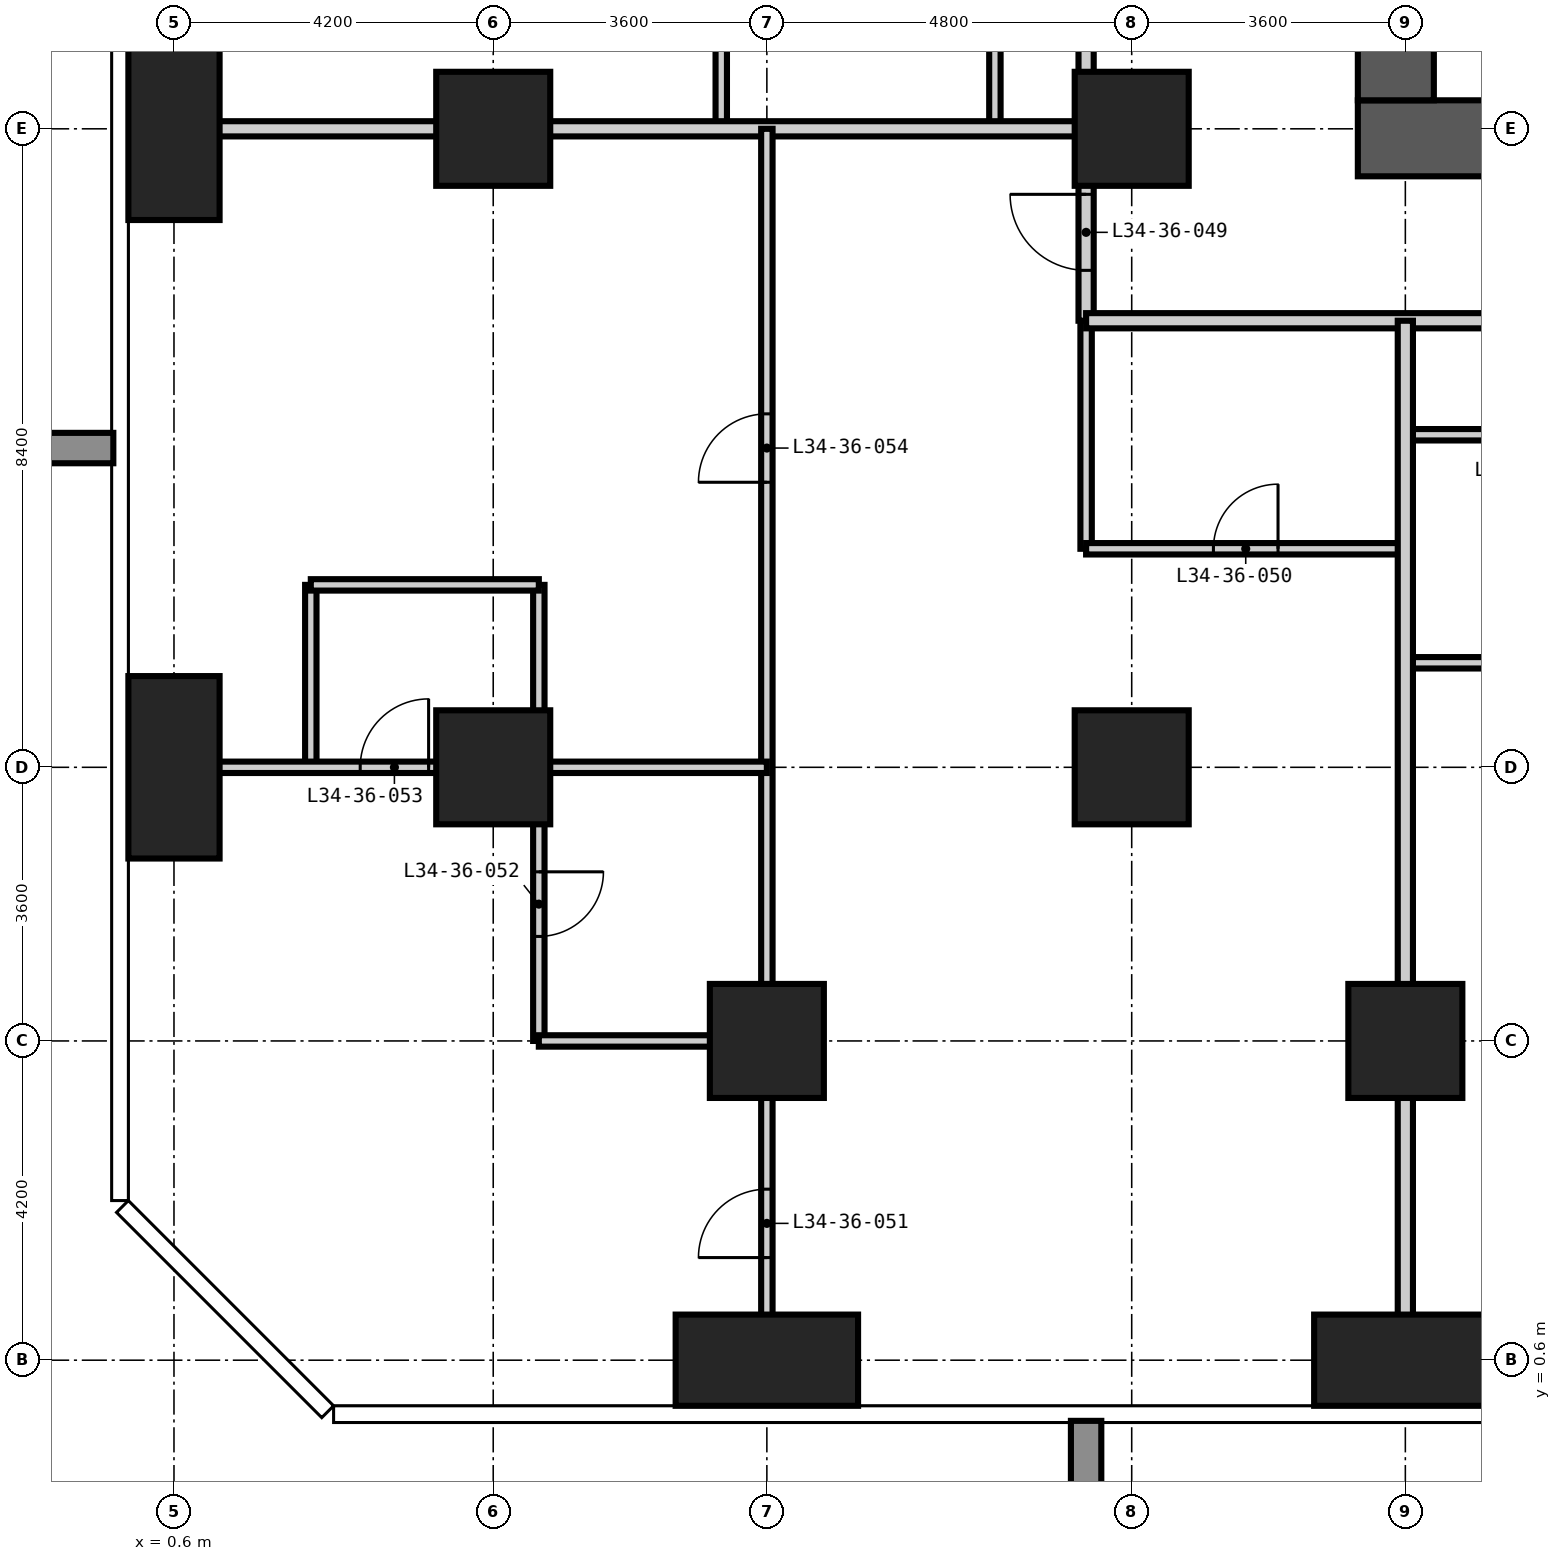
"""IFC4 building model, lengths in metres.
Left out: names, types, materials, properties, quantities, classifications, styles, units other than length and angle.
Written with IfcOpenShell. Run it as: python <this file> out.ifc"""

import sys

from ifc_helpers import new_model, si_unit, direction, frame, frame_2d, origin, origin_2d, place, context, subcontext, project, spatial, rectangle, extrude, element, fill, save


model = new_model("IFC4")
c1 = context("Model", 3, precision=1e-05, world=origin(), true_north=direction((0.0, 1.0)))
c2 = subcontext(c1, "Body", "Model", "MODEL_VIEW")
j1 = project(units=[si_unit("LENGTHUNIT", "METRE"), si_unit("PLANEANGLEUNIT", "RADIAN")], contexts=[c1])
p1 = place(None, origin())
s1 = spatial("IfcSite", under=j1, at=p1, CompositionType="ELEMENT")
p2 = place(p1, origin())
s2 = spatial("IfcBuilding", under=s1, at=p2, CompositionType="ELEMENT")
p3 = place(p2, frame((0.0, 0.0, 133.2)))
s3 = spatial("IfcBuildingStorey", under=s2, at=p3, CompositionType="ELEMENT", Elevation=133.2)
for number, where, z_axis, x_axis in (
    (1, (0.6, 8.4, -0.35), (0.0, 0.0, 1.0), (1.0, 0.0, 0.0)),
    (2, (0.6, 16.8, -0.35), (0.0, 0.0, 1.0), (1.0, 0.0, 0.0)),
):
    element("IfcColumn", number, at=place(p3, frame(where, z_axis=z_axis, x_axis=x_axis)), inside=s3, PredefinedType="COLUMN", context=c2, shape_type="SweptSolid", body=[
        extrude(rectangle(XDim=1.2, YDim=2.4, at=origin_2d()), origin(), (0.0, 0.0, 1.0), 3.6),
    ])
for number, where, z_axis, x_axis in (
    (3, (4.8, 8.4, -0.35), (0.0, 0.0, 1.0), (1.0, 0.0, 0.0)),
    (4, (4.8, 16.8, -0.35), (0.0, 0.0, 1.0), (1.0, 0.0, 0.0)),
):
    element("IfcColumn", number, at=place(p3, frame(where, z_axis=z_axis, x_axis=x_axis)), inside=s3, PredefinedType="COLUMN", context=c2, shape_type="SweptSolid", body=[
        extrude(rectangle(XDim=1.5, YDim=1.5, at=origin_2d()), origin(), (0.0, 0.0, 1.0), 3.6),
    ])
p4 = place(p3, frame((8.4, 0.6, -0.35), z_axis=(0.0, 0.0, 1.0), x_axis=(1.0, 0.0, 0.0)))
e5 = element("IfcColumn", 5, at=p4, inside=s3, PredefinedType="COLUMN", context=c2, shape_type="SweptSolid", body=[
    extrude(rectangle(XDim=2.4, YDim=1.2, at=origin_2d()), origin(), (0.0, 0.0, 1.0), 3.6),
])
for number, where, z_axis, x_axis in (
    (6, (8.4, 4.8, -0.35), (0.0, 0.0, 1.0), (1.0, 0.0, 0.0)),
    (7, (13.2, 8.4, -0.35), (0.0, 0.0, 1.0), (1.0, 0.0, 0.0)),
    (8, (13.2, 16.8, -0.35), (0.0, 0.0, 1.0), (1.0, 0.0, 0.0)),
):
    element("IfcColumn", number, at=place(p3, frame(where, z_axis=z_axis, x_axis=x_axis)), inside=s3, PredefinedType="COLUMN", context=c2, shape_type="SweptSolid", body=[
        extrude(rectangle(XDim=1.5, YDim=1.5, at=origin_2d()), origin(), (0.0, 0.0, 1.0), 3.6),
    ])
p5 = place(p3, frame((16.8, 0.6, -0.35), z_axis=(0.0, 0.0, 1.0), x_axis=(1.0, 0.0, 0.0)))
e9 = element("IfcColumn", 9, at=p5, inside=s3, PredefinedType="COLUMN", context=c2, shape_type="SweptSolid", body=[
    extrude(rectangle(XDim=2.4, YDim=1.2, at=origin_2d()), origin(), (0.0, 0.0, 1.0), 3.6),
])
p6 = place(p3, frame((16.8, 4.8, -0.35), z_axis=(0.0, 0.0, 1.0), x_axis=(1.0, 0.0, 0.0)))
e10 = element("IfcColumn", 10, at=p6, inside=s3, PredefinedType="COLUMN", context=c2, shape_type="SweptSolid", body=[
    extrude(rectangle(XDim=1.5, YDim=1.5, at=origin_2d()), origin(), (0.0, 0.0, 1.0), 3.6),
])
p7 = place(p3, frame((16.175, 16.675, -0.35), z_axis=(0.0, 0.0, 1.0), x_axis=(1.0, 0.0, 0.0)))
e11 = element("IfcWall", 11, at=p7, inside=s3, PredefinedType="SHEAR", context=c2, shape_type="SweptSolid", body=[
    extrude(rectangle(XDim=26.45, YDim=1.0, at=frame_2d((13.225, 0.0))), origin(), (0.0, 0.0, 1.0), 3.6),
])
p8 = place(p7, frame((12.725, 0.0, 0.35)))
e12 = element("IfcOpeningElement", 12, at=p8, cuts=e11, PredefinedType="OPENING", context=c2, shape_type="SweptSolid", body=[
    extrude(rectangle(XDim=1.0, YDim=2.1, at=frame_2d((0.5, 1.05))), frame((0.0, 0.51, 0.0), z_axis=(0.0, -1.0, 0.0), x_axis=(1.0, 0.0, 0.0)), (0.0, 0.0, 1.0), 1.02),
])
p9 = place(p7, frame((19.025, 0.0, 0.35)))
e13 = element("IfcOpeningElement", 13, at=p9, cuts=e11, PredefinedType="OPENING", context=c2, shape_type="SweptSolid", body=[
    extrude(rectangle(XDim=1.0, YDim=2.1, at=frame_2d((0.5, 1.05))), frame((0.0, 0.51, 0.0), z_axis=(0.0, -1.0, 0.0), x_axis=(1.0, 0.0, 0.0)), (0.0, 0.0, 1.0), 1.02),
])
p10 = place(p3, frame((16.675, 41.625, -0.35), z_axis=(0.0, 0.0, 1.0), x_axis=(0.0, -1.0, 0.0)))
e14 = element("IfcWall", 14, at=p10, inside=s3, PredefinedType="SHEAR", context=c2, shape_type="SweptSolid", body=[
    extrude(rectangle(XDim=24.45, YDim=1.0, at=frame_2d((12.225, 0.0))), origin(), (0.0, 0.0, 1.0), 3.6),
])
p11 = place(p10, frame((11.325, 0.0, 0.35)))
e15 = element("IfcOpeningElement", 15, at=p11, cuts=e14, PredefinedType="OPENING", context=c2, shape_type="SweptSolid", body=[
    extrude(rectangle(XDim=1.8, YDim=2.2, at=frame_2d((0.9, 1.1))), frame((0.0, 0.51, 0.0), z_axis=(0.0, -1.0, 0.0), x_axis=(1.0, 0.0, 0.0)), (0.0, 0.0, 1.0), 1.02),
])
p12 = place(p10, frame((20.125, 0.0, 0.35)))
e16 = element("IfcOpeningElement", 16, at=p12, cuts=e14, PredefinedType="OPENING", context=c2, shape_type="SweptSolid", body=[
    extrude(rectangle(XDim=1.0, YDim=2.1, at=frame_2d((0.5, 1.05))), frame((0.0, 0.51, 0.0), z_axis=(0.0, -1.0, 0.0), x_axis=(1.0, 0.0, 0.0)), (0.0, 0.0, 1.0), 1.02),
])
p13 = place(p10, frame((5.425, 0.0, 0.35)))
e17 = element("IfcOpeningElement", 17, at=p13, cuts=e14, PredefinedType="OPENING", context=c2, shape_type="SweptSolid", body=[
    extrude(rectangle(XDim=1.0, YDim=2.1, at=frame_2d((0.5, 1.05))), frame((0.0, 0.51, 0.0), z_axis=(0.0, -1.0, 0.0), x_axis=(1.0, 0.0, 0.0)), (0.0, 0.0, 1.0), 1.02),
])
p14 = place(p3, frame((5.4, 4.8, 0.0), z_axis=(0.0, 0.0, 1.0), x_axis=(0.0, 1.0, 0.0)))
e18 = element("IfcWall", 18, at=p14, inside=s3, PredefinedType="PARTITIONING", context=c2, shape_type="SweptSolid", body=[
    extrude(rectangle(XDim=3.6, YDim=0.15, at=frame_2d((1.8, 0.0))), origin(), (0.0, 0.0, 1.0), 3.25),
])
p15 = place(p14, frame((1.375, 0.0, 0.0)))
e19 = element("IfcOpeningElement", 19, at=p15, cuts=e18, PredefinedType="OPENING", context=c2, shape_type="SweptSolid", body=[
    extrude(rectangle(XDim=0.85, YDim=2.1, at=frame_2d((0.425, 1.05))), frame((0.0, 0.085, 0.0), z_axis=(0.0, -1.0, 0.0), x_axis=(1.0, 0.0, 0.0)), (0.0, 0.0, 1.0), 0.17),
])
for number, where, z_axis, x_axis in (
    (20, (7.8, 16.8, 0.0), (0.0, 0.0, 1.0), (0.0, 1.0, 0.0)),
    (21, (11.4, 16.8, 0.0), (0.0, 0.0, 1.0), (0.0, 1.0, 0.0)),
):
    element("IfcWall", number, at=place(p3, frame(where, z_axis=z_axis, x_axis=x_axis)), inside=s3, PredefinedType="PARTITIONING", context=c2, shape_type="SweptSolid", body=[
        extrude(rectangle(XDim=2.7, YDim=0.15, at=frame_2d((1.35, 0.0))), origin(), (0.0, 0.0, 1.0), 3.25),
    ])
for number, where, z_axis, x_axis in (
    (22, (12.6, 11.275, 0.0), (0.0, 0.0, 1.0), (0.0, 1.0, 0.0)),
    (23, (5.4, 4.8, 0.0), (0.0, 0.0, 1.0), (1.0, 0.0, 0.0)),
):
    element("IfcWall", number, at=place(p3, frame(where, z_axis=z_axis, x_axis=x_axis)), inside=s3, PredefinedType="PARTITIONING", context=c2, shape_type="SweptSolid", body=[
        extrude(rectangle(XDim=3.0, YDim=0.15, at=frame_2d((1.5, 0.0))), origin(), (0.0, 0.0, 1.0), 3.25),
    ])
p16 = place(p3, frame((16.8, 9.775, 0.0), z_axis=(0.0, 0.0, 1.0), x_axis=(1.0, 0.0, 0.0)))
e24 = element("IfcWall", 24, at=p16, inside=s3, PredefinedType="PARTITIONING", context=c2, shape_type="SweptSolid", body=[
    extrude(rectangle(XDim=2.7, YDim=0.15, at=frame_2d((1.35, 0.0))), origin(), (0.0, 0.0, 1.0), 3.25),
])
p17 = place(p3, frame((12.6, 11.275, 0.0), z_axis=(0.0, 0.0, 1.0), x_axis=(1.0, 0.0, 0.0)))
e25 = element("IfcWall", 25, at=p17, inside=s3, PredefinedType="PARTITIONING", context=c2, shape_type="SweptSolid", body=[
    extrude(rectangle(XDim=4.2, YDim=0.15, at=frame_2d((2.1, 0.0))), origin(), (0.0, 0.0, 1.0), 3.25),
])
p18 = place(p17, frame((1.675, 0.0, 0.0)))
e26 = element("IfcOpeningElement", 26, at=p18, cuts=e25, PredefinedType="OPENING", context=c2, shape_type="SweptSolid", body=[
    extrude(rectangle(XDim=0.85, YDim=2.1, at=frame_2d((0.425, 1.05))), frame((0.0, 0.085, 0.0), z_axis=(0.0, -1.0, 0.0), x_axis=(1.0, 0.0, 0.0)), (0.0, 0.0, 1.0), 0.17),
])
p19 = place(p3, frame((16.8, 12.775, 0.0), z_axis=(0.0, 0.0, 1.0), x_axis=(1.0, 0.0, 0.0)))
e27 = element("IfcWall", 27, at=p19, inside=s3, PredefinedType="PARTITIONING", context=c2, shape_type="SweptSolid", body=[
    extrude(rectangle(XDim=2.7, YDim=0.15, at=frame_2d((1.35, 0.0))), origin(), (0.0, 0.0, 1.0), 3.25),
])
p20 = place(p3, frame((12.6, 14.275, 0.0), z_axis=(0.0, 0.0, 1.0), x_axis=(0.0, 1.0, 0.0)))
e28 = element("IfcWall", 28, at=p20, inside=s3, PredefinedType="PARTITIONING", context=c2, shape_type="SweptSolid", body=[
    extrude(rectangle(XDim=30.85, YDim=0.2, at=frame_2d((15.425, 0.0))), origin(), (0.0, 0.0, 1.0), 3.25),
])
p21 = place(p20, frame((6.225, 0.0, 0.0)))
e29 = element("IfcOpeningElement", 29, at=p21, cuts=e28, PredefinedType="OPENING", context=c2, shape_type="SweptSolid", body=[
    extrude(rectangle(XDim=1.0, YDim=2.2, at=frame_2d((0.5, 1.1))), frame((0.0, 0.11, 0.0), z_axis=(0.0, -1.0, 0.0), x_axis=(1.0, 0.0, 0.0)), (0.0, 0.0, 1.0), 0.22),
])
p22 = place(p20, frame((12.525, 0.0, 0.0)))
e30 = element("IfcOpeningElement", 30, at=p22, cuts=e28, PredefinedType="OPENING", context=c2, shape_type="SweptSolid", body=[
    extrude(rectangle(XDim=1.0, YDim=2.2, at=frame_2d((0.5, 1.1))), frame((0.0, 0.11, 0.0), z_axis=(0.0, -1.0, 0.0), x_axis=(1.0, 0.0, 0.0)), (0.0, 0.0, 1.0), 0.22),
])
p23 = place(p20, frame((20.925, 0.0, 0.0)))
e31 = element("IfcOpeningElement", 31, at=p23, cuts=e28, PredefinedType="OPENING", context=c2, shape_type="SweptSolid", body=[
    extrude(rectangle(XDim=1.0, YDim=2.2, at=frame_2d((0.5, 1.1))), frame((0.0, 0.11, 0.0), z_axis=(0.0, -1.0, 0.0), x_axis=(1.0, 0.0, 0.0)), (0.0, 0.0, 1.0), 0.22),
])
p24 = place(p20, frame((0.663, 0.0, 0.0)))
e32 = element("IfcOpeningElement", 32, at=p24, cuts=e28, PredefinedType="OPENING", context=c2, shape_type="SweptSolid", body=[
    extrude(rectangle(XDim=1.0, YDim=2.2, at=frame_2d((0.5, 1.1))), frame((0.0, 0.11, 0.0), z_axis=(0.0, -1.0, 0.0), x_axis=(1.0, 0.0, 0.0)), (0.0, 0.0, 1.0), 0.22),
])
p25 = place(p20, frame((28.787, 0.0, 0.0)))
e33 = element("IfcOpeningElement", 33, at=p25, cuts=e28, PredefinedType="OPENING", context=c2, shape_type="SweptSolid", body=[
    extrude(rectangle(XDim=1.0, YDim=2.2, at=frame_2d((0.5, 1.1))), frame((0.0, 0.11, 0.0), z_axis=(0.0, -1.0, 0.0), x_axis=(1.0, 0.0, 0.0)), (0.0, 0.0, 1.0), 0.22),
])
p26 = place(p3, frame((45.725, 14.275, 0.0), z_axis=(0.0, 0.0, 1.0), x_axis=(-1.0, 0.0, 0.0)))
e34 = element("IfcWall", 34, at=p26, inside=s3, PredefinedType="PARTITIONING", context=c2, shape_type="SweptSolid", body=[
    extrude(rectangle(XDim=33.125, YDim=0.2, at=frame_2d((16.562, 0.0))), origin(), (0.0, 0.0, 1.0), 3.25),
])
p27 = place(p26, frame((26.325, 0.0, 0.0)))
e35 = element("IfcOpeningElement", 35, at=p27, cuts=e34, PredefinedType="OPENING", context=c2, shape_type="SweptSolid", body=[
    extrude(rectangle(XDim=1.0, YDim=2.2, at=frame_2d((0.5, 1.1))), frame((0.0, 0.11, 0.0), z_axis=(0.0, -1.0, 0.0), x_axis=(1.0, 0.0, 0.0)), (0.0, 0.0, 1.0), 0.22),
])
p28 = place(p26, frame((21.225, 0.0, 0.0)))
e36 = element("IfcOpeningElement", 36, at=p28, cuts=e34, PredefinedType="OPENING", context=c2, shape_type="SweptSolid", body=[
    extrude(rectangle(XDim=1.0, YDim=2.2, at=frame_2d((0.5, 1.1))), frame((0.0, 0.11, 0.0), z_axis=(0.0, -1.0, 0.0), x_axis=(1.0, 0.0, 0.0)), (0.0, 0.0, 1.0), 0.22),
])
p29 = place(p26, frame((12.825, 0.0, 0.0)))
e37 = element("IfcOpeningElement", 37, at=p29, cuts=e34, PredefinedType="OPENING", context=c2, shape_type="SweptSolid", body=[
    extrude(rectangle(XDim=1.0, YDim=2.2, at=frame_2d((0.5, 1.1))), frame((0.0, 0.11, 0.0), z_axis=(0.0, -1.0, 0.0), x_axis=(1.0, 0.0, 0.0)), (0.0, 0.0, 1.0), 0.22),
])
p30 = place(p26, frame((5.325, 0.0, 0.0)))
e38 = element("IfcOpeningElement", 38, at=p30, cuts=e34, PredefinedType="OPENING", context=c2, shape_type="SweptSolid", body=[
    extrude(rectangle(XDim=1.0, YDim=2.2, at=frame_2d((0.5, 1.1))), frame((0.0, 0.11, 0.0), z_axis=(0.0, -1.0, 0.0), x_axis=(1.0, 0.0, 0.0)), (0.0, 0.0, 1.0), 0.22),
])
p31 = place(p3, frame((16.8, -0.018, 0.0), z_axis=(0.0, 0.0, 1.0), x_axis=(0.0, 1.0, 0.0)))
e39 = element("IfcWall", 39, at=p31, inside=s3, PredefinedType="PARTITIONING", context=c2, shape_type="SweptSolid", body=[
    extrude(rectangle(XDim=14.293, YDim=0.2, at=frame_2d((7.146, 0.0))), origin(), (0.0, 0.0, 1.0), 3.25),
])
p32 = place(p3, frame((-0.018, 16.8, 0.0), z_axis=(0.0, 0.0, 1.0), x_axis=(1.0, 0.0, 0.0)))
e40 = element("IfcWall", 40, at=p32, inside=s3, PredefinedType="PARTITIONING", context=c2, shape_type="SweptSolid", body=[
    extrude(rectangle(XDim=12.618, YDim=0.2, at=frame_2d((6.309, 0.0))), origin(), (0.0, 0.0, 1.0), 3.25),
])
for number, where, z_axis, x_axis in (
    (41, (2.4, 8.4, 0.0), (0.0, 0.0, 1.0), (0.0, 1.0, 0.0)),
    (42, (5.4, 8.4, 0.0), (0.0, 0.0, 1.0), (0.0, 1.0, 0.0)),
):
    element("IfcWall", number, at=place(p3, frame(where, z_axis=z_axis, x_axis=x_axis)), inside=s3, PredefinedType="PARTITIONING", context=c2, shape_type="SweptSolid", body=[
        extrude(rectangle(XDim=2.4, YDim=0.15, at=frame_2d((1.2, 0.0))), origin(), (0.0, 0.0, 1.0), 3.25),
    ])
p33 = place(p3, frame((8.4, -0.018, 0.0), z_axis=(0.0, 0.0, 1.0), x_axis=(0.0, 1.0, 0.0)))
e43 = element("IfcWall", 43, at=p33, inside=s3, PredefinedType="PARTITIONING", context=c2, shape_type="SweptSolid", body=[
    extrude(rectangle(XDim=16.818, YDim=0.15, at=frame_2d((8.409, 0.0))), origin(), (0.0, 0.0, 1.0), 3.25),
])
p34 = place(p33, frame((1.968, 0.0, 0.0)))
e44 = element("IfcOpeningElement", 44, at=p34, cuts=e43, PredefinedType="OPENING", context=c2, shape_type="SweptSolid", body=[
    extrude(rectangle(XDim=0.9, YDim=2.1, at=frame_2d((0.45, 1.05))), frame((0.0, 0.085, 0.0), z_axis=(0.0, -1.0, 0.0), x_axis=(1.0, 0.0, 0.0)), (0.0, 0.0, 1.0), 0.17),
])
p35 = place(p33, frame((12.168, 0.0, 0.0)))
e45 = element("IfcOpeningElement", 45, at=p35, cuts=e43, PredefinedType="OPENING", context=c2, shape_type="SweptSolid", body=[
    extrude(rectangle(XDim=0.9, YDim=2.1, at=frame_2d((0.45, 1.05))), frame((0.0, 0.085, 0.0), z_axis=(0.0, -1.0, 0.0), x_axis=(1.0, 0.0, 0.0)), (0.0, 0.0, 1.0), 0.17),
])
p36 = place(p3, frame((-0.018, 8.4, 0.0), z_axis=(0.0, 0.0, 1.0), x_axis=(1.0, 0.0, 0.0)))
e46 = element("IfcWall", 46, at=p36, inside=s3, PredefinedType="PARTITIONING", context=c2, shape_type="SweptSolid", body=[
    extrude(rectangle(XDim=8.418, YDim=0.15, at=frame_2d((4.209, 0.0))), origin(), (0.0, 0.0, 1.0), 3.25),
])
p37 = place(p36, frame((3.068, 0.0, 0.0)))
e47 = element("IfcOpeningElement", 47, at=p37, cuts=e46, PredefinedType="OPENING", context=c2, shape_type="SweptSolid", body=[
    extrude(rectangle(XDim=0.9, YDim=2.1, at=frame_2d((0.45, 1.05))), frame((0.0, 0.085, 0.0), z_axis=(0.0, -1.0, 0.0), x_axis=(1.0, 0.0, 0.0)), (0.0, 0.0, 1.0), 0.17),
])
p38 = place(p3, frame((2.4, 10.8, 0.0), z_axis=(0.0, 0.0, 1.0), x_axis=(1.0, 0.0, 0.0)))
e48 = element("IfcWall", 48, at=p38, inside=s3, PredefinedType="PARTITIONING", context=c2, shape_type="SweptSolid", body=[
    extrude(rectangle(XDim=3.0, YDim=0.15, at=frame_2d((1.5, 0.0))), origin(), (0.0, 0.0, 1.0), 3.25),
])
p39 = place(p24, origin())
e49 = element("IfcDoor", 49, at=p39, inside=s3, OperationType="SINGLE_SWING_RIGHT", PredefinedType="DOOR", context=c2, shape_type="SweptSolid", body=[
    extrude(rectangle(XDim=1.0, YDim=2.2, at=frame_2d((0.5, 1.1))), frame((0.0, 0.025, 0.0), z_axis=(0.0, -1.0, 0.0), x_axis=(1.0, 0.0, 0.0)), (0.0, 0.0, 1.0), 0.05),
])
fill(e32, e49)
p40 = place(p18, origin())
e50 = element("IfcDoor", 50, at=p40, inside=s3, OperationType="SINGLE_SWING_RIGHT", PredefinedType="DOOR", context=c2, shape_type="SweptSolid", body=[
    extrude(rectangle(XDim=0.85, YDim=2.1, at=frame_2d((0.425, 1.05))), frame((0.0, 0.025, 0.0), z_axis=(0.0, -1.0, 0.0), x_axis=(1.0, 0.0, 0.0)), (0.0, 0.0, 1.0), 0.05),
])
fill(e26, e50)
p41 = place(p34, origin())
e51 = element("IfcDoor", 51, at=p41, inside=s3, OperationType="SINGLE_SWING_LEFT", PredefinedType="DOOR", context=c2, shape_type="SweptSolid", body=[
    extrude(rectangle(XDim=0.9, YDim=2.1, at=frame_2d((0.45, 1.05))), frame((0.0, 0.025, 0.0), z_axis=(0.0, -1.0, 0.0), x_axis=(1.0, 0.0, 0.0)), (0.0, 0.0, 1.0), 0.05),
])
fill(e44, e51)
p42 = place(p15, frame((0.85, 0.0, 0.0), z_axis=(0.0, 0.0, 1.0), x_axis=(-1.0, 0.0, 0.0)))
e52 = element("IfcDoor", 52, at=p42, inside=s3, OperationType="SINGLE_SWING_LEFT", PredefinedType="DOOR", context=c2, shape_type="SweptSolid", body=[
    extrude(rectangle(XDim=0.85, YDim=2.1, at=frame_2d((0.425, 1.05))), frame((0.0, 0.025, 0.0), z_axis=(0.0, -1.0, 0.0), x_axis=(1.0, 0.0, 0.0)), (0.0, 0.0, 1.0), 0.05),
])
fill(e19, e52)
p43 = place(p37, origin())
e53 = element("IfcDoor", 53, at=p43, inside=s3, OperationType="SINGLE_SWING_RIGHT", PredefinedType="DOOR", context=c2, shape_type="SweptSolid", body=[
    extrude(rectangle(XDim=0.9, YDim=2.1, at=frame_2d((0.45, 1.05))), frame((0.0, 0.025, 0.0), z_axis=(0.0, -1.0, 0.0), x_axis=(1.0, 0.0, 0.0)), (0.0, 0.0, 1.0), 0.05),
])
fill(e47, e53)
p44 = place(p35, origin())
e54 = element("IfcDoor", 54, at=p44, inside=s3, OperationType="SINGLE_SWING_LEFT", PredefinedType="DOOR", context=c2, shape_type="SweptSolid", body=[
    extrude(rectangle(XDim=0.9, YDim=2.1, at=frame_2d((0.45, 1.05))), frame((0.0, 0.025, 0.0), z_axis=(0.0, -1.0, 0.0), x_axis=(1.0, 0.0, 0.0)), (0.0, 0.0, 1.0), 0.05),
])
fill(e45, e54)
save(model, sys.argv[1])
